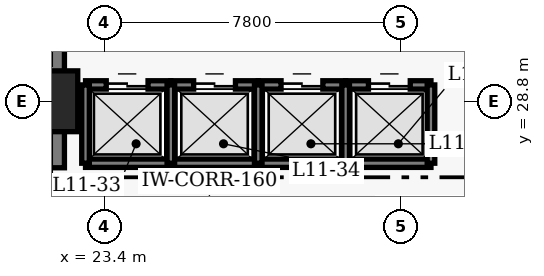
"""IFC4 building model, lengths in metres.
Left out: names, types, materials, properties, quantities, classifications, styles, units other than length and angle.
Written with IfcOpenShell. Run it as: python <this file> out.ifc"""

import sys

from ifc_helpers import new_model, si_unit, direction, frame, frame_2d, origin, origin_2d, place, context, subcontext, project, spatial, rectangle, extrude, element, fill, save


model = new_model("IFC4")
c1 = context("Model", 3, precision=1e-05, world=origin(), true_north=direction((0.0, 1.0)))
c2 = subcontext(c1, "Body", "Model", "MODEL_VIEW")
j1 = project(units=[si_unit("LENGTHUNIT", "METRE"), si_unit("PLANEANGLEUNIT", "RADIAN")], contexts=[c1])
p1 = place(None, origin())
s1 = spatial("IfcSite", under=j1, at=p1, CompositionType="ELEMENT")
p2 = place(p1, origin())
s2 = spatial("IfcBuilding", under=s1, at=p2, CompositionType="ELEMENT")
p3 = place(p2, frame((0.0, 0.0, 48.8)))
s3 = spatial("IfcBuildingStorey", under=s2, at=p3, CompositionType="ELEMENT", Elevation=48.8)
p4 = place(p3, frame((21.9, 27.05, 0.0), z_axis=(0.0, 0.0, 1.0), x_axis=(0.0, 1.0, 0.0)))
e1 = element("IfcWall", 1, at=p4, inside=s3, PredefinedType="SHEAR", context=c2, shape_type="SweptSolid", body=[
    extrude(rectangle(XDim=13.72, YDim=0.9, at=frame_2d((6.86, 0.0))), origin(), (0.0, 0.0, 1.0), 3.8),
])
p5 = place(p3, frame((21.9, 28.8, 0.0), z_axis=(0.0, 0.0, 1.0), x_axis=(1.0, 0.0, 0.0)))
e2 = element("IfcColumn", 2, at=p5, inside=s3, PredefinedType="COLUMN", context=c2, shape_type="SweptSolid", body=[
    extrude(rectangle(XDim=1.6, YDim=1.6, at=origin_2d()), origin(), (0.0, 0.0, 1.0), 3.8),
])
p6 = place(p3, frame((22.905, 29.23, 0.0), z_axis=(0.0, 0.0, 1.0), x_axis=(1.0, 0.0, 0.0)))
e3 = element("IfcWall", 3, at=p6, inside=s3, PredefinedType="SHEAR", context=c2, shape_type="SweptSolid", body=[
    extrude(rectangle(XDim=2.245, YDim=0.22, at=frame_2d((1.123, 0.0))), origin(), (0.0, 0.0, 1.0), 3.8),
])
p7 = place(p6, frame((0.545, 0.0, 0.0)))
e4 = element("IfcOpeningElement", 4, at=p7, cuts=e3, PredefinedType="OPENING", context=c2, shape_type="SweptSolid", body=[
    extrude(rectangle(XDim=1.1, YDim=2.15, at=frame_2d((0.55, 1.075))), frame((0.0, 0.12, 0.0), z_axis=(0.0, -1.0, 0.0), x_axis=(1.0, 0.0, 0.0)), (0.0, 0.0, 1.0), 0.24),
])
p8 = place(p3, frame((22.905, 27.17, 0.0), z_axis=(0.0, 0.0, 1.0), x_axis=(1.0, 0.0, 0.0)))
e5 = element("IfcWall", 5, at=p8, inside=s3, PredefinedType="SHEAR", context=c2, shape_type="SweptSolid", body=[
    extrude(rectangle(XDim=2.245, YDim=0.22, at=frame_2d((1.123, 0.0))), origin(), (0.0, 0.0, 1.0), 3.8),
])
p9 = place(p3, frame((22.905, 27.17, 0.0), z_axis=(0.0, 0.0, 1.0), x_axis=(0.0, 1.0, 0.0)))
e6 = element("IfcWall", 6, at=p9, inside=s3, PredefinedType="SHEAR", context=c2, shape_type="SweptSolid", body=[
    extrude(rectangle(XDim=2.06, YDim=0.2, at=frame_2d((1.03, 0.0))), origin(), (0.0, 0.0, 1.0), 3.8),
])
p10 = place(p3, frame((25.15, 29.23, 0.0), z_axis=(0.0, 0.0, 1.0), x_axis=(1.0, 0.0, 0.0)))
e7 = element("IfcWall", 7, at=p10, inside=s3, PredefinedType="SHEAR", context=c2, shape_type="SweptSolid", body=[
    extrude(rectangle(XDim=2.3, YDim=0.22, at=frame_2d((1.15, 0.0))), origin(), (0.0, 0.0, 1.0), 3.8),
])
p11 = place(p10, frame((0.6, 0.0, 0.0)))
e8 = element("IfcOpeningElement", 8, at=p11, cuts=e7, PredefinedType="OPENING", context=c2, shape_type="SweptSolid", body=[
    extrude(rectangle(XDim=1.1, YDim=2.15, at=frame_2d((0.55, 1.075))), frame((0.0, 0.12, 0.0), z_axis=(0.0, -1.0, 0.0), x_axis=(1.0, 0.0, 0.0)), (0.0, 0.0, 1.0), 0.24),
])
p12 = place(p3, frame((25.15, 27.17, 0.0), z_axis=(0.0, 0.0, 1.0), x_axis=(1.0, 0.0, 0.0)))
e9 = element("IfcWall", 9, at=p12, inside=s3, PredefinedType="SHEAR", context=c2, shape_type="SweptSolid", body=[
    extrude(rectangle(XDim=2.3, YDim=0.22, at=frame_2d((1.15, 0.0))), origin(), (0.0, 0.0, 1.0), 3.8),
])
p13 = place(p3, frame((25.15, 27.17, 0.0), z_axis=(0.0, 0.0, 1.0), x_axis=(0.0, 1.0, 0.0)))
e10 = element("IfcWall", 10, at=p13, inside=s3, PredefinedType="SHEAR", context=c2, shape_type="SweptSolid", body=[
    extrude(rectangle(XDim=2.06, YDim=0.2, at=frame_2d((1.03, 0.0))), origin(), (0.0, 0.0, 1.0), 3.8),
])
p14 = place(p3, frame((27.45, 29.23, 0.0), z_axis=(0.0, 0.0, 1.0), x_axis=(1.0, 0.0, 0.0)))
e11 = element("IfcWall", 11, at=p14, inside=s3, PredefinedType="SHEAR", context=c2, shape_type="SweptSolid", body=[
    extrude(rectangle(XDim=2.3, YDim=0.22, at=frame_2d((1.15, 0.0))), origin(), (0.0, 0.0, 1.0), 3.8),
])
p15 = place(p14, frame((0.6, 0.0, 0.0)))
e12 = element("IfcOpeningElement", 12, at=p15, cuts=e11, PredefinedType="OPENING", context=c2, shape_type="SweptSolid", body=[
    extrude(rectangle(XDim=1.1, YDim=2.15, at=frame_2d((0.55, 1.075))), frame((0.0, 0.12, 0.0), z_axis=(0.0, -1.0, 0.0), x_axis=(1.0, 0.0, 0.0)), (0.0, 0.0, 1.0), 0.24),
])
p16 = place(p3, frame((27.45, 27.17, 0.0), z_axis=(0.0, 0.0, 1.0), x_axis=(1.0, 0.0, 0.0)))
e13 = element("IfcWall", 13, at=p16, inside=s3, PredefinedType="SHEAR", context=c2, shape_type="SweptSolid", body=[
    extrude(rectangle(XDim=2.3, YDim=0.22, at=frame_2d((1.15, 0.0))), origin(), (0.0, 0.0, 1.0), 3.8),
])
p17 = place(p3, frame((27.45, 27.17, 0.0), z_axis=(0.0, 0.0, 1.0), x_axis=(0.0, 1.0, 0.0)))
e14 = element("IfcWall", 14, at=p17, inside=s3, PredefinedType="SHEAR", context=c2, shape_type="SweptSolid", body=[
    extrude(rectangle(XDim=2.06, YDim=0.2, at=frame_2d((1.03, 0.0))), origin(), (0.0, 0.0, 1.0), 3.8),
])
p18 = place(p3, frame((29.75, 29.23, 0.0), z_axis=(0.0, 0.0, 1.0), x_axis=(1.0, 0.0, 0.0)))
e15 = element("IfcWall", 15, at=p18, inside=s3, PredefinedType="SHEAR", context=c2, shape_type="SweptSolid", body=[
    extrude(rectangle(XDim=2.245, YDim=0.22, at=frame_2d((1.123, 0.0))), origin(), (0.0, 0.0, 1.0), 3.8),
])
p19 = place(p18, frame((0.6, 0.0, 0.0)))
e16 = element("IfcOpeningElement", 16, at=p19, cuts=e15, PredefinedType="OPENING", context=c2, shape_type="SweptSolid", body=[
    extrude(rectangle(XDim=1.1, YDim=2.15, at=frame_2d((0.55, 1.075))), frame((0.0, 0.12, 0.0), z_axis=(0.0, -1.0, 0.0), x_axis=(1.0, 0.0, 0.0)), (0.0, 0.0, 1.0), 0.24),
])
p20 = place(p3, frame((29.75, 27.17, 0.0), z_axis=(0.0, 0.0, 1.0), x_axis=(1.0, 0.0, 0.0)))
e17 = element("IfcWall", 17, at=p20, inside=s3, PredefinedType="SHEAR", context=c2, shape_type="SweptSolid", body=[
    extrude(rectangle(XDim=2.245, YDim=0.22, at=frame_2d((1.123, 0.0))), origin(), (0.0, 0.0, 1.0), 3.8),
])
for number, where, z_axis, x_axis in (
    (18, (29.75, 27.17, 0.0), (0.0, 0.0, 1.0), (0.0, 1.0, 0.0)),
    (19, (31.995, 27.17, 0.0), (0.0, 0.0, 1.0), (0.0, 1.0, 0.0)),
):
    element("IfcWall", number, at=place(p3, frame(where, z_axis=z_axis, x_axis=x_axis)), inside=s3, PredefinedType="SHEAR", context=c2, shape_type="SweptSolid", body=[
        extrude(rectangle(XDim=2.06, YDim=0.2, at=frame_2d((1.03, 0.0))), origin(), (0.0, 0.0, 1.0), 3.8),
    ])
p21 = place(p7, origin())
e20 = element("IfcDoor", 20, at=p21, inside=s3, OperationType="DOUBLE_DOOR_SLIDING", PredefinedType="DOOR", context=c2, shape_type="SweptSolid", body=[
    extrude(rectangle(XDim=1.1, YDim=2.15, at=frame_2d((0.55, 1.075))), frame((0.0, 0.025, 0.0), z_axis=(0.0, -1.0, 0.0), x_axis=(1.0, 0.0, 0.0)), (0.0, 0.0, 1.0), 0.05),
])
fill(e4, e20)
p22 = place(p11, origin())
e21 = element("IfcDoor", 21, at=p22, inside=s3, OperationType="DOUBLE_DOOR_SLIDING", PredefinedType="DOOR", context=c2, shape_type="SweptSolid", body=[
    extrude(rectangle(XDim=1.1, YDim=2.15, at=frame_2d((0.55, 1.075))), frame((0.0, 0.025, 0.0), z_axis=(0.0, -1.0, 0.0), x_axis=(1.0, 0.0, 0.0)), (0.0, 0.0, 1.0), 0.05),
])
fill(e8, e21)
p23 = place(p15, origin())
e22 = element("IfcDoor", 22, at=p23, inside=s3, OperationType="DOUBLE_DOOR_SLIDING", PredefinedType="DOOR", context=c2, shape_type="SweptSolid", body=[
    extrude(rectangle(XDim=1.1, YDim=2.15, at=frame_2d((0.55, 1.075))), frame((0.0, 0.025, 0.0), z_axis=(0.0, -1.0, 0.0), x_axis=(1.0, 0.0, 0.0)), (0.0, 0.0, 1.0), 0.05),
])
fill(e12, e22)
p24 = place(p19, origin())
e23 = element("IfcDoor", 23, at=p24, inside=s3, OperationType="DOUBLE_DOOR_SLIDING", PredefinedType="DOOR", context=c2, shape_type="SweptSolid", body=[
    extrude(rectangle(XDim=1.1, YDim=2.15, at=frame_2d((0.55, 1.075))), frame((0.0, 0.025, 0.0), z_axis=(0.0, -1.0, 0.0), x_axis=(1.0, 0.0, 0.0)), (0.0, 0.0, 1.0), 0.05),
])
fill(e16, e23)
save(model, sys.argv[1])
